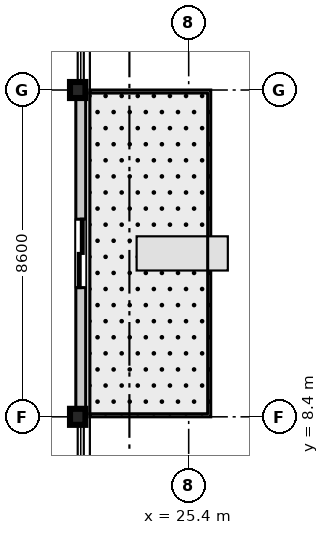
"""IFC4 building model, lengths in metres.
Left out: names, types, materials, properties, quantities, classifications, styles, units other than length and angle.
Written with IfcOpenShell. Run it as: python <this file> out.ifc"""

import sys

from ifc_helpers import new_model, si_unit, direction, frame, frame_2d, origin, origin_2d, place, context, subcontext, project, spatial, rectangle, i_section, extrude, source, transform, mapped, element, fill, save


model = new_model("IFC4")
c1 = context("Model", 3, precision=1e-05, world=origin(), true_north=direction((0.0, 1.0)))
c2 = subcontext(c1, "Body", "Model", "MODEL_VIEW")
j1 = project(units=[si_unit("LENGTHUNIT", "METRE"), si_unit("PLANEANGLEUNIT", "RADIAN")], contexts=[c1])
p1 = place(None, origin())
s1 = spatial("IfcSite", under=j1, at=p1, CompositionType="ELEMENT")
p2 = place(p1, origin())
s2 = spatial("IfcBuilding", under=s1, at=p2, CompositionType="ELEMENT")
p3 = place(p2, frame((0.0, 0.0, 163.6)))
s3 = spatial("IfcBuildingStorey", under=s2, at=p3, CompositionType="ELEMENT", Elevation=163.6)
m1 = source(origin(), c2, "Body", "SweptSolid", [
    extrude(i_section(OverallWidth=0.406, OverallDepth=0.422, WebThickness=0.019, FlangeThickness=0.03, at=origin_2d()), origin(), (0.0, 0.0, 1.0), 3.605),
])
for number, where, z_axis, x_axis in (
    (1, (22.48, 8.4, 0.0), (0.0, 0.0, 1.0), (1.0, 0.0, 0.0)),
    (2, (22.48, 17.0, 0.0), (0.0, 0.0, 1.0), (1.0, 0.0, 0.0)),
):
    element("IfcColumn", number, at=place(p3, frame(where, z_axis=z_axis, x_axis=x_axis)), inside=s3, PredefinedType="COLUMN", context=c2, shape_type="MappedRepresentation", body=[
        mapped(m1, transform((0.0, 0.0, 0.0), scale=1.0)),
    ])
m2 = source(origin(), c2, "Body", "SweptSolid", [
    extrude(rectangle(XDim=8.6, YDim=0.26, at=frame_2d((4.3, 0.0))), origin(), (0.0, 0.0, 1.0), 2.87),
])
p4 = place(p3, frame((22.56, 8.4, 0.0), z_axis=(0.0, 0.0, 1.0), x_axis=(0.0, 1.0, 0.0)))
e3 = element("IfcWall", 3, at=p4, inside=s3, PredefinedType="STANDARD", context=c2, shape_type="MappedRepresentation", body=[
    mapped(m2, transform((0.0, 0.0, 0.0), scale=1.0)),
])
p5 = place(p4, frame((3.4, 0.0, 0.0)))
e4 = element("IfcOpeningElement", 4, at=p5, cuts=e3, PredefinedType="OPENING", context=c2, shape_type="SweptSolid", body=[
    extrude(rectangle(XDim=1.8, YDim=2.25, at=frame_2d((0.9, 1.125))), frame((0.0, 0.14, 0.0), z_axis=(0.0, -1.0, 0.0), x_axis=(1.0, 0.0, 0.0)), (0.0, 0.0, 1.0), 0.28),
])
m3 = source(origin(), c2, "Body", "SweptSolid", [
    extrude(rectangle(XDim=1.8, YDim=2.25, at=frame_2d((0.9, 1.125))), frame((0.0, 0.025, 0.0), z_axis=(0.0, -1.0, 0.0), x_axis=(1.0, 0.0, 0.0)), (0.0, 0.0, 1.0), 0.05),
])
p6 = place(p5, frame((1.8, 0.0, 0.0), z_axis=(0.0, 0.0, 1.0), x_axis=(-1.0, 0.0, 0.0)))
e5 = element("IfcDoor", 5, at=p6, inside=s3, OperationType="DOUBLE_DOOR_SLIDING", PredefinedType="DOOR", context=c2, shape_type="MappedRepresentation", body=[
    mapped(m3, transform((0.0, 0.0, 0.0), scale=1.0)),
])
fill(e4, e5)
save(model, sys.argv[1])
